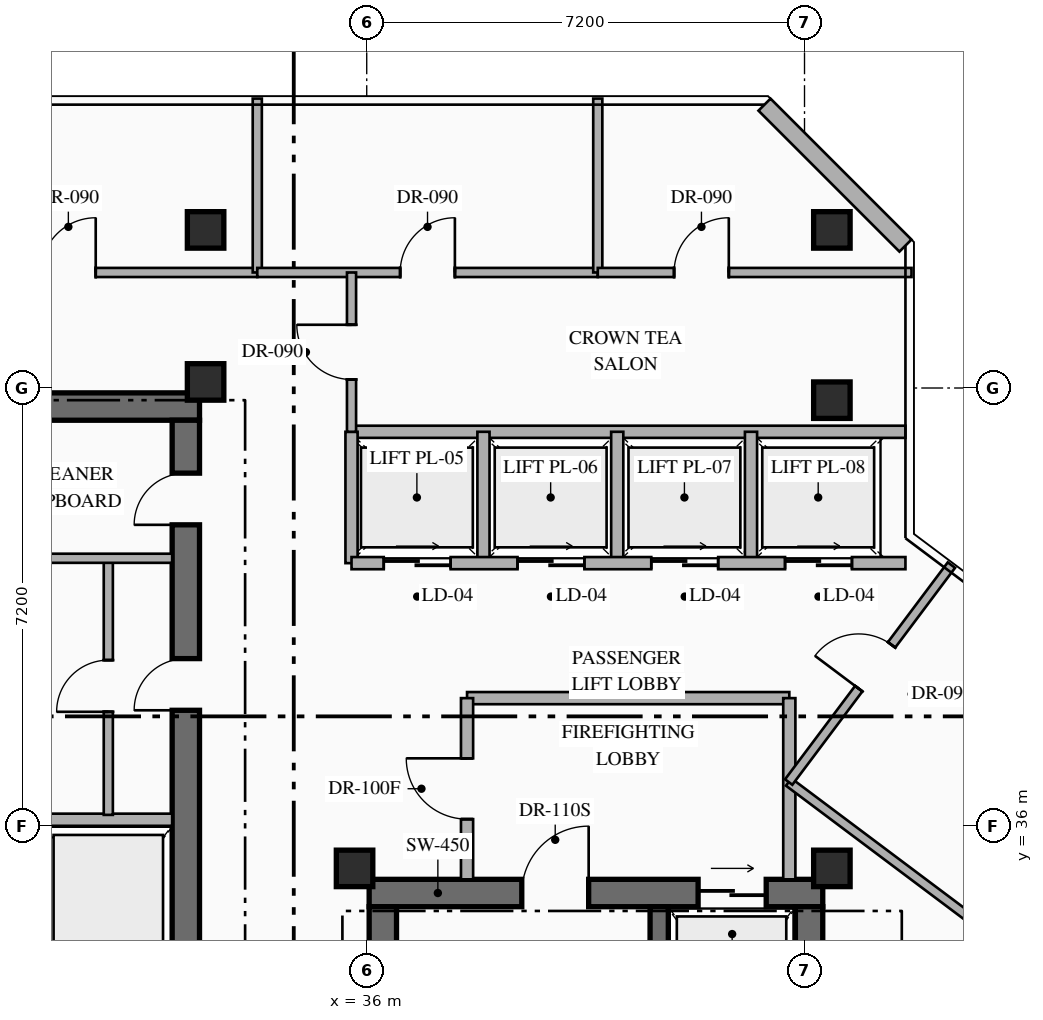
"""IFC4 building model, lengths in metres.
Left out: names, types, materials, properties, quantities, classifications, styles, units other than length and angle.
Written with IfcOpenShell. Run it as: python <this file> out.ifc"""

import sys

from ifc_helpers import new_model, si_unit, direction, frame, frame_2d, origin, origin_2d, place, context, subcontext, project, spatial, rectangle, hollow_rectangle, extrude, element, fill, save


model = new_model("IFC4")
c1 = context("Model", 3, precision=1e-05, world=origin(), true_north=direction((0.0, 1.0)))
c2 = subcontext(c1, "Body", "Model", "MODEL_VIEW")
j1 = project(units=[si_unit("LENGTHUNIT", "METRE"), si_unit("PLANEANGLEUNIT", "RADIAN")], contexts=[c1])
p1 = place(None, origin())
s1 = spatial("IfcSite", under=j1, at=p1, CompositionType="ELEMENT")
p2 = place(p1, origin())
s2 = spatial("IfcBuilding", under=s1, at=p2, CompositionType="ELEMENT")
p3 = place(p2, frame((0.0, 0.0, 277.95)))
s3 = spatial("IfcBuildingStorey", under=s2, at=p3, CompositionType="ELEMENT", Elevation=277.95)
p4 = place(p3, frame((25.77, 42.895, 0.0), z_axis=(0.0, 0.0, 1.0), x_axis=(1.0, 0.0, 0.0)))
e1 = element("IfcWall", 1, at=p4, inside=s3, PredefinedType="SHEAR", context=c2, shape_type="SweptSolid", body=[
    extrude(rectangle(XDim=7.48, YDim=0.45, at=frame_2d((3.74, 0.0))), origin(), (0.0, 0.0, 1.0), 4.0),
])
p5 = place(p3, frame((33.025, 33.19, 0.0), z_axis=(0.0, 0.0, 1.0), x_axis=(0.0, 1.0, 0.0)))
e2 = element("IfcWall", 2, at=p5, inside=s3, PredefinedType="SHEAR", context=c2, shape_type="SweptSolid", body=[
    extrude(rectangle(XDim=9.48, YDim=0.45, at=frame_2d((4.74, 0.0))), origin(), (0.0, 0.0, 1.0), 4.0),
])
p6 = place(p5, frame((4.71, 0.0, 0.0)))
e3 = element("IfcOpeningElement", 3, at=p6, cuts=e2, PredefinedType="OPENING", context=c2, shape_type="SweptSolid", body=[
    extrude(rectangle(XDim=0.85, YDim=2.08, at=frame_2d((0.425, 1.04))), frame((0.0, 0.235, 0.0), z_axis=(0.0, -1.0, 0.0), x_axis=(1.0, 0.0, 0.0)), (0.0, 0.0, 1.0), 0.47),
])
p7 = place(p5, frame((7.76, 0.0, 0.0)))
e4 = element("IfcOpeningElement", 4, at=p7, cuts=e2, PredefinedType="OPENING", context=c2, shape_type="SweptSolid", body=[
    extrude(rectangle(XDim=0.85, YDim=2.08, at=frame_2d((0.425, 1.04))), frame((0.0, 0.235, 0.0), z_axis=(0.0, -1.0, 0.0), x_axis=(1.0, 0.0, 0.0)), (0.0, 0.0, 1.0), 0.47),
])
p8 = place(p3, frame((36.04, 34.895, 0.0), z_axis=(0.0, 0.0, 1.0), x_axis=(1.0, 0.0, 0.0)))
e5 = element("IfcWall", 5, at=p8, inside=s3, PredefinedType="SHEAR", context=c2, shape_type="SweptSolid", body=[
    extrude(rectangle(XDim=7.46, YDim=0.45, at=frame_2d((3.73, 0.0))), origin(), (0.0, 0.0, 1.0), 4.0),
])
p9 = place(p8, frame((2.51, 0.0, 0.0)))
e6 = element("IfcOpeningElement", 6, at=p9, cuts=e5, PredefinedType="OPENING", context=c2, shape_type="SweptSolid", body=[
    extrude(rectangle(XDim=1.1, YDim=2.2, at=frame_2d((0.55, 1.1))), frame((0.0, 0.235, 0.0), z_axis=(0.0, -1.0, 0.0), x_axis=(1.0, 0.0, 0.0)), (0.0, 0.0, 1.0), 0.47),
])
p10 = place(p8, frame((5.41, 0.0, 0.0)))
e7 = element("IfcOpeningElement", 7, at=p10, cuts=e5, PredefinedType="OPENING", context=c2, shape_type="SweptSolid", body=[
    extrude(rectangle(XDim=1.12, YDim=2.15, at=frame_2d((0.56, 1.075))), frame((0.0, 0.235, 0.0), z_axis=(0.0, -1.0, 0.0), x_axis=(1.0, 0.0, 0.0)), (0.0, 0.0, 1.0), 0.47),
])
p11 = place(p3, frame((36.265, 25.19, 0.0), z_axis=(0.0, 0.0, 1.0), x_axis=(0.0, 1.0, 0.0)))
e8 = element("IfcWall", 8, at=p11, inside=s3, PredefinedType="SHEAR", context=c2, shape_type="SweptSolid", body=[
    extrude(rectangle(XDim=9.48, YDim=0.45, at=frame_2d((4.74, 0.0))), origin(), (0.0, 0.0, 1.0), 4.0),
])
p12 = place(p3, frame((43.275, 25.19, 0.0), z_axis=(0.0, 0.0, 1.0), x_axis=(0.0, 1.0, 0.0)))
e9 = element("IfcWall", 9, at=p12, inside=s3, PredefinedType="SHEAR", context=c2, shape_type="SweptSolid", body=[
    extrude(rectangle(XDim=9.48, YDim=0.45, at=frame_2d((4.74, 0.0))), origin(), (0.0, 0.0, 1.0), 4.0),
])
p13 = place(p12, frame((1.51, 0.0, 0.0)))
e10 = element("IfcOpeningElement", 10, at=p13, cuts=e9, PredefinedType="OPENING", context=c2, shape_type="SweptSolid", body=[
    extrude(rectangle(XDim=0.85, YDim=2.08, at=frame_2d((0.425, 1.04))), frame((0.0, 0.235, 0.0), z_axis=(0.0, -1.0, 0.0), x_axis=(1.0, 0.0, 0.0)), (0.0, 0.0, 1.0), 0.47),
])
p14 = place(p12, frame((4.76, 0.0, 0.0)))
e11 = element("IfcOpeningElement", 11, at=p14, cuts=e9, PredefinedType="OPENING", context=c2, shape_type="SweptSolid", body=[
    extrude(rectangle(XDim=0.85, YDim=2.08, at=frame_2d((0.425, 1.04))), frame((0.0, 0.235, 0.0), z_axis=(0.0, -1.0, 0.0), x_axis=(1.0, 0.0, 0.0)), (0.0, 0.0, 1.0), 0.47),
])
p15 = place(p3, frame((40.81, 25.19, 0.0), z_axis=(0.0, 0.0, 1.0), x_axis=(0.0, 1.0, 0.0)))
e12 = element("IfcWall", 12, at=p15, inside=s3, PredefinedType="SHEAR", context=c2, shape_type="SweptSolid", body=[
    extrude(rectangle(XDim=9.48, YDim=0.3, at=frame_2d((4.74, 0.0))), origin(), (0.0, 0.0, 1.0), 4.0),
])
for number, where, z_axis, x_axis in (
    (13, (33.35, 43.3, 0.0), (0.0, 0.0, 1.0), (1.0, 0.0, 0.0)),
    (14, (35.8, 35.3, 0.0), (0.0, 0.0, 1.0), (1.0, 0.0, 0.0)),
    (15, (43.65, 35.3, 0.0), (0.0, 0.0, 1.0), (1.0, 0.0, 0.0)),
    (16, (43.65, 43.0, 0.0), (0.0, 0.0, 1.0), (1.0, 0.0, 0.0)),
    (17, (33.35, 45.8, 0.0), (0.0, 0.0, 1.0), (1.0, 0.0, 0.0)),
    (18, (43.65, 45.8, 0.0), (0.0, 0.0, 1.0), (1.0, 0.0, 0.0)),
):
    element("IfcColumn", number, at=place(p3, frame(where, z_axis=z_axis, x_axis=x_axis)), inside=s3, PredefinedType="COLUMN", context=c2, shape_type="SweptSolid", body=[
        extrude(hollow_rectangle(XDim=0.6, YDim=0.6, WallThickness=0.025, at=origin_2d()), origin(), (0.0, 0.0, 1.0), 4.0),
    ])
p16 = place(p3, frame((42.542, 47.86, 0.0), z_axis=(0.0, 0.0, 1.0), x_axis=(0.707106781187, -0.707106781187, 0.0)))
e19 = element("IfcWall", 19, at=p16, inside=s3, PredefinedType="STANDARD", context=c2, shape_type="SweptSolid", body=[
    extrude(rectangle(XDim=3.278, YDim=0.28, at=frame_2d((1.639, 0.0))), origin(), (0.0, 0.0, 1.0), 3.74),
])
p17 = place(p3, frame((30.7, 36.1, 0.0), z_axis=(0.0, 0.0, 1.0), x_axis=(1.0, 0.0, 0.0)))
e20 = element("IfcWall", 20, at=p17, inside=s3, PredefinedType="STANDARD", context=c2, shape_type="SweptSolid", body=[
    extrude(rectangle(XDim=2.1, YDim=0.2, at=frame_2d((1.05, 0.0))), origin(), (0.0, 0.0, 1.0), 3.74),
])
p18 = place(p3, frame((31.75, 36.18, 0.0), z_axis=(0.0, 0.0, 1.0), x_axis=(0.0, 1.0, 0.0)))
e21 = element("IfcWall", 21, at=p18, inside=s3, PredefinedType="PARTITIONING", context=c2, shape_type="SweptSolid", body=[
    extrude(rectangle(XDim=4.24, YDim=0.15, at=frame_2d((2.12, 0.0))), origin(), (0.0, 0.0, 1.0), 3.74),
])
p19 = place(p18, frame((1.695, 0.0, 0.0)))
e22 = element("IfcOpeningElement", 22, at=p19, cuts=e21, PredefinedType="OPENING", context=c2, shape_type="SweptSolid", body=[
    extrude(rectangle(XDim=0.85, YDim=2.08, at=frame_2d((0.425, 1.04))), frame((0.0, 0.085, 0.0), z_axis=(0.0, -1.0, 0.0), x_axis=(1.0, 0.0, 0.0)), (0.0, 0.0, 1.0), 0.17),
])
p20 = place(p3, frame((30.7, 40.4, 0.0), z_axis=(0.0, 0.0, 1.0), x_axis=(1.0, 0.0, 0.0)))
e23 = element("IfcWall", 23, at=p20, inside=s3, PredefinedType="PARTITIONING", context=c2, shape_type="SweptSolid", body=[
    extrude(rectangle(XDim=2.1, YDim=0.15, at=frame_2d((1.05, 0.0))), origin(), (0.0, 0.0, 1.0), 3.74),
])
p21 = place(p3, frame((37.65, 38.1, 0.0), z_axis=(0.0, 0.0, 1.0), x_axis=(1.0, 0.0, 0.0)))
e24 = element("IfcWall", 24, at=p21, inside=s3, PredefinedType="STANDARD", context=c2, shape_type="SweptSolid", body=[
    extrude(rectangle(XDim=5.3, YDim=0.2, at=frame_2d((2.65, 0.0))), origin(), (0.0, 0.0, 1.0), 3.74),
])
p22 = place(p3, frame((42.95, 35.12, 0.0), z_axis=(0.0, 0.0, 1.0), x_axis=(0.0, 1.0, 0.0)))
e25 = element("IfcWall", 25, at=p22, inside=s3, PredefinedType="STANDARD", context=c2, shape_type="SweptSolid", body=[
    extrude(rectangle(XDim=2.98, YDim=0.2, at=frame_2d((1.49, 0.0))), origin(), (0.0, 0.0, 1.0), 3.74),
])
p23 = place(p3, frame((37.65, 35.12, 0.0), z_axis=(0.0, 0.0, 1.0), x_axis=(0.0, 1.0, 0.0)))
e26 = element("IfcWall", 26, at=p23, inside=s3, PredefinedType="STANDARD", context=c2, shape_type="SweptSolid", body=[
    extrude(rectangle(XDim=2.98, YDim=0.2, at=frame_2d((1.49, 0.0))), origin(), (0.0, 0.0, 1.0), 3.74),
])
p24 = place(p23, frame((0.99, 0.0, 0.0)))
e27 = element("IfcOpeningElement", 27, at=p24, cuts=e26, PredefinedType="OPENING", context=c2, shape_type="SweptSolid", body=[
    extrude(rectangle(XDim=1.0, YDim=2.2, at=frame_2d((0.5, 1.1))), frame((0.0, 0.11, 0.0), z_axis=(0.0, -1.0, 0.0), x_axis=(1.0, 0.0, 0.0)), (0.0, 0.0, 1.0), 0.22),
])
p25 = place(p3, frame((35.75, 42.48, 0.0), z_axis=(0.0, 0.0, 1.0), x_axis=(1.0, 0.0, 0.0)))
e28 = element("IfcWall", 28, at=p25, inside=s3, PredefinedType="STANDARD", context=c2, shape_type="SweptSolid", body=[
    extrude(rectangle(XDim=9.11, YDim=0.2, at=frame_2d((4.555, 0.0))), origin(), (0.0, 0.0, 1.0), 3.74),
])
for number, where, z_axis, x_axis in (
    (29, (35.75, 40.32, 0.0), (0.0, 0.0, 1.0), (0.0, 1.0, 0.0)),
    (30, (37.92, 40.32, 0.0), (0.0, 0.0, 1.0), (0.0, 1.0, 0.0)),
    (31, (40.12, 40.32, 0.0), (0.0, 0.0, 1.0), (0.0, 1.0, 0.0)),
    (32, (42.32, 40.32, 0.0), (0.0, 0.0, 1.0), (0.0, 1.0, 0.0)),
):
    element("IfcWall", number, at=place(p3, frame(where, z_axis=z_axis, x_axis=x_axis)), inside=s3, PredefinedType="STANDARD", context=c2, shape_type="SweptSolid", body=[
        extrude(rectangle(XDim=2.16, YDim=0.2, at=frame_2d((1.08, 0.0))), origin(), (0.0, 0.0, 1.0), 3.74),
    ])
p26 = place(p3, frame((35.75, 40.32, 0.0), z_axis=(0.0, 0.0, 1.0), x_axis=(1.0, 0.0, 0.0)))
e33 = element("IfcWall", 33, at=p26, inside=s3, PredefinedType="STANDARD", context=c2, shape_type="SweptSolid", body=[
    extrude(rectangle(XDim=9.11, YDim=0.2, at=frame_2d((4.555, 0.0))), origin(), (0.0, 0.0, 1.0), 3.74),
])
p27 = place(p26, frame((0.53, 0.0, 0.0)))
e34 = element("IfcOpeningElement", 34, at=p27, cuts=e33, PredefinedType="OPENING", context=c2, shape_type="SweptSolid", body=[
    extrude(rectangle(XDim=1.1, YDim=2.18, at=frame_2d((0.55, 1.09))), frame((0.0, 0.11, 0.0), z_axis=(0.0, -1.0, 0.0), x_axis=(1.0, 0.0, 0.0)), (0.0, 0.0, 1.0), 0.22),
])
p28 = place(p26, frame((2.73, 0.0, 0.0)))
e35 = element("IfcOpeningElement", 35, at=p28, cuts=e33, PredefinedType="OPENING", context=c2, shape_type="SweptSolid", body=[
    extrude(rectangle(XDim=1.1, YDim=2.18, at=frame_2d((0.55, 1.09))), frame((0.0, 0.11, 0.0), z_axis=(0.0, -1.0, 0.0), x_axis=(1.0, 0.0, 0.0)), (0.0, 0.0, 1.0), 0.22),
])
p29 = place(p26, frame((4.93, 0.0, 0.0)))
e36 = element("IfcOpeningElement", 36, at=p29, cuts=e33, PredefinedType="OPENING", context=c2, shape_type="SweptSolid", body=[
    extrude(rectangle(XDim=1.1, YDim=2.18, at=frame_2d((0.55, 1.09))), frame((0.0, 0.11, 0.0), z_axis=(0.0, -1.0, 0.0), x_axis=(1.0, 0.0, 0.0)), (0.0, 0.0, 1.0), 0.22),
])
p30 = place(p26, frame((7.13, 0.0, 0.0)))
e37 = element("IfcOpeningElement", 37, at=p30, cuts=e33, PredefinedType="OPENING", context=c2, shape_type="SweptSolid", body=[
    extrude(rectangle(XDim=1.1, YDim=2.18, at=frame_2d((0.55, 1.09))), frame((0.0, 0.11, 0.0), z_axis=(0.0, -1.0, 0.0), x_axis=(1.0, 0.0, 0.0)), (0.0, 0.0, 1.0), 0.22),
])
p31 = place(p3, frame((28.4, 45.1, 0.0), z_axis=(0.0, 0.0, 1.0), x_axis=(1.0, 0.0, 0.0)))
e38 = element("IfcWall", 38, at=p31, inside=s3, PredefinedType="PARTITIONING", context=c2, shape_type="SweptSolid", body=[
    extrude(rectangle(XDim=5.8, YDim=0.15, at=frame_2d((2.9, 0.0))), origin(), (0.0, 0.0, 1.0), 3.74),
])
p32 = place(p31, frame((2.243, 0.0, 0.0)))
e39 = element("IfcOpeningElement", 39, at=p32, cuts=e38, PredefinedType="OPENING", context=c2, shape_type="SweptSolid", body=[
    extrude(rectangle(XDim=0.9, YDim=2.15, at=frame_2d((0.45, 1.075))), frame((0.0, 0.085, 0.0), z_axis=(0.0, -1.0, 0.0), x_axis=(1.0, 0.0, 0.0)), (0.0, 0.0, 1.0), 0.17),
])
p33 = place(p3, frame((34.2, 45.1, 0.0), z_axis=(0.0, 0.0, 1.0), x_axis=(0.0, 1.0, 0.0)))
e40 = element("IfcWall", 40, at=p33, inside=s3, PredefinedType="PARTITIONING", context=c2, shape_type="SweptSolid", body=[
    extrude(rectangle(XDim=2.86, YDim=0.15, at=frame_2d((1.43, 0.0))), origin(), (0.0, 0.0, 1.0), 3.74),
])
p34 = place(p3, frame((34.2, 45.1, 0.0), z_axis=(0.0, 0.0, 1.0), x_axis=(1.0, 0.0, 0.0)))
e41 = element("IfcWall", 41, at=p34, inside=s3, PredefinedType="PARTITIONING", context=c2, shape_type="SweptSolid", body=[
    extrude(rectangle(XDim=5.6, YDim=0.15, at=frame_2d((2.8, 0.0))), origin(), (0.0, 0.0, 1.0), 3.74),
])
p35 = place(p34, frame((2.35, 0.0, 0.0)))
e42 = element("IfcOpeningElement", 42, at=p35, cuts=e41, PredefinedType="OPENING", context=c2, shape_type="SweptSolid", body=[
    extrude(rectangle(XDim=0.9, YDim=2.15, at=frame_2d((0.45, 1.075))), frame((0.0, 0.085, 0.0), z_axis=(0.0, -1.0, 0.0), x_axis=(1.0, 0.0, 0.0)), (0.0, 0.0, 1.0), 0.17),
])
p36 = place(p3, frame((39.8, 45.1, 0.0), z_axis=(0.0, 0.0, 1.0), x_axis=(0.0, 1.0, 0.0)))
e43 = element("IfcWall", 43, at=p36, inside=s3, PredefinedType="PARTITIONING", context=c2, shape_type="SweptSolid", body=[
    extrude(rectangle(XDim=2.86, YDim=0.15, at=frame_2d((1.43, 0.0))), origin(), (0.0, 0.0, 1.0), 3.74),
])
p37 = place(p3, frame((39.8, 45.1, 0.0), z_axis=(0.0, 0.0, 1.0), x_axis=(1.0, 0.0, 0.0)))
e44 = element("IfcWall", 44, at=p37, inside=s3, PredefinedType="PARTITIONING", context=c2, shape_type="SweptSolid", body=[
    extrude(rectangle(XDim=5.16, YDim=0.15, at=frame_2d((2.58, 0.0))), origin(), (0.0, 0.0, 1.0), 3.74),
])
p38 = place(p37, frame((1.255, 0.0, 0.0)))
e45 = element("IfcOpeningElement", 45, at=p38, cuts=e44, PredefinedType="OPENING", context=c2, shape_type="SweptSolid", body=[
    extrude(rectangle(XDim=0.9, YDim=2.15, at=frame_2d((0.45, 1.075))), frame((0.0, 0.085, 0.0), z_axis=(0.0, -1.0, 0.0), x_axis=(1.0, 0.0, 0.0)), (0.0, 0.0, 1.0), 0.17),
])
p39 = place(p3, frame((35.75, 42.48, 0.0), z_axis=(0.0, 0.0, 1.0), x_axis=(0.0, 1.0, 0.0)))
e46 = element("IfcWall", 46, at=p39, inside=s3, PredefinedType="PARTITIONING", context=c2, shape_type="SweptSolid", body=[
    extrude(rectangle(XDim=2.62, YDim=0.15, at=frame_2d((1.31, 0.0))), origin(), (0.0, 0.0, 1.0), 3.74),
])
p40 = place(p39, frame((0.86, 0.0, 0.0)))
e47 = element("IfcOpeningElement", 47, at=p40, cuts=e46, PredefinedType="OPENING", context=c2, shape_type="SweptSolid", body=[
    extrude(rectangle(XDim=0.9, YDim=2.15, at=frame_2d((0.45, 1.075))), frame((0.0, 0.085, 0.0), z_axis=(0.0, -1.0, 0.0), x_axis=(1.0, 0.0, 0.0)), (0.0, 0.0, 1.0), 0.17),
])
p41 = place(p3, frame((43.48, 30.107, 0.0), z_axis=(0.0, 0.0, 1.0), x_axis=(0.600015730265, 0.799988202059, 0.0)))
e48 = element("IfcWall", 48, at=p41, inside=s3, PredefinedType="PARTITIONING", context=c2, shape_type="SweptSolid", body=[
    extrude(rectangle(XDim=4.967, YDim=0.15, at=frame_2d((2.483, 0.0))), origin(), (0.0, 0.0, 1.0), 3.74),
])
p42 = place(p41, frame((2.199, 0.0, 0.0)))
e49 = element("IfcOpeningElement", 49, at=p42, cuts=e48, PredefinedType="OPENING", context=c2, shape_type="SweptSolid", body=[
    extrude(rectangle(XDim=0.9, YDim=2.15, at=frame_2d((0.45, 1.075))), frame((0.0, 0.085, 0.0), z_axis=(0.0, -1.0, 0.0), x_axis=(1.0, 0.0, 0.0)), (0.0, 0.0, 1.0), 0.17),
])
p43 = place(p3, frame((42.94, 36.72, 0.0), z_axis=(0.0, 0.0, 1.0), x_axis=(0.800013316712, -0.599982243973, 0.0)))
e50 = element("IfcWall", 50, at=p43, inside=s3, PredefinedType="PARTITIONING", context=c2, shape_type="SweptSolid", body=[
    extrude(rectangle(XDim=4.4, YDim=0.15, at=frame_2d((2.2, 0.0))), origin(), (0.0, 0.0, 1.0), 3.295),
])
p44 = place(p3, frame((42.94, 36.72, 0.0), z_axis=(0.0, 0.0, 1.0), x_axis=(0.599991241767, 0.8000065686, 0.0)))
e51 = element("IfcWall", 51, at=p44, inside=s3, PredefinedType="PARTITIONING", context=c2, shape_type="SweptSolid", body=[
    extrude(rectangle(XDim=4.46, YDim=0.15, at=frame_2d((2.23, 0.0))), origin(), (0.0, 0.0, 1.0), 3.74),
])
p45 = place(p44, frame((1.92, 0.0, 0.0)))
e52 = element("IfcOpeningElement", 52, at=p45, cuts=e51, PredefinedType="OPENING", context=c2, shape_type="SweptSolid", body=[
    extrude(rectangle(XDim=0.9, YDim=2.15, at=frame_2d((0.45, 1.075))), frame((0.0, 0.085, 0.0), z_axis=(0.0, -1.0, 0.0), x_axis=(1.0, 0.0, 0.0)), (0.0, 0.0, 1.0), 0.17),
])
p46 = place(p9, origin())
e53 = element("IfcDoor", 53, at=p46, inside=s3, OperationType="SINGLE_SWING_RIGHT", PredefinedType="DOOR", context=c2, shape_type="SweptSolid", body=[
    extrude(rectangle(XDim=1.1, YDim=2.2, at=frame_2d((0.55, 1.1))), frame((0.0, 0.025, 0.0), z_axis=(0.0, -1.0, 0.0), x_axis=(1.0, 0.0, 0.0)), (0.0, 0.0, 1.0), 0.05),
])
fill(e6, e53)
p47 = place(p10, origin())
e54 = element("IfcDoor", 54, at=p47, inside=s3, OperationType="SLIDING_TO_RIGHT", PredefinedType="USERDEFINED", context=c2, shape_type="SweptSolid", body=[
    extrude(rectangle(XDim=1.12, YDim=2.15, at=frame_2d((0.56, 1.075))), frame((0.0, 0.025, 0.0), z_axis=(0.0, -1.0, 0.0), x_axis=(1.0, 0.0, 0.0)), (0.0, 0.0, 1.0), 0.05),
])
fill(e7, e54)
p48 = place(p6, origin())
e55 = element("IfcDoor", 55, at=p48, inside=s3, OperationType="SINGLE_SWING_LEFT", PredefinedType="DOOR", context=c2, shape_type="SweptSolid", body=[
    extrude(rectangle(XDim=0.85, YDim=2.08, at=frame_2d((0.425, 1.04))), frame((0.0, 0.025, 0.0), z_axis=(0.0, -1.0, 0.0), x_axis=(1.0, 0.0, 0.0)), (0.0, 0.0, 1.0), 0.05),
])
fill(e3, e55)
p49 = place(p7, origin())
e56 = element("IfcDoor", 56, at=p49, inside=s3, OperationType="SINGLE_SWING_LEFT", PredefinedType="DOOR", context=c2, shape_type="SweptSolid", body=[
    extrude(rectangle(XDim=0.85, YDim=2.08, at=frame_2d((0.425, 1.04))), frame((0.0, 0.025, 0.0), z_axis=(0.0, -1.0, 0.0), x_axis=(1.0, 0.0, 0.0)), (0.0, 0.0, 1.0), 0.05),
])
fill(e4, e56)
p50 = place(p19, origin())
e57 = element("IfcDoor", 57, at=p50, inside=s3, OperationType="SINGLE_SWING_LEFT", PredefinedType="DOOR", context=c2, shape_type="SweptSolid", body=[
    extrude(rectangle(XDim=0.85, YDim=2.08, at=frame_2d((0.425, 1.04))), frame((0.0, 0.025, 0.0), z_axis=(0.0, -1.0, 0.0), x_axis=(1.0, 0.0, 0.0)), (0.0, 0.0, 1.0), 0.05),
])
fill(e22, e57)
p51 = place(p24, origin())
e58 = element("IfcDoor", 58, at=p51, inside=s3, OperationType="SINGLE_SWING_RIGHT", PredefinedType="DOOR", context=c2, shape_type="SweptSolid", body=[
    extrude(rectangle(XDim=1.0, YDim=2.2, at=frame_2d((0.5, 1.1))), frame((0.0, 0.025, 0.0), z_axis=(0.0, -1.0, 0.0), x_axis=(1.0, 0.0, 0.0)), (0.0, 0.0, 1.0), 0.05),
])
fill(e27, e58)
p52 = place(p27, origin())
e59 = element("IfcDoor", 59, at=p52, inside=s3, OperationType="SLIDING_TO_RIGHT", PredefinedType="USERDEFINED", context=c2, shape_type="SweptSolid", body=[
    extrude(rectangle(XDim=1.1, YDim=2.18, at=frame_2d((0.55, 1.09))), frame((0.0, 0.025, 0.0), z_axis=(0.0, -1.0, 0.0), x_axis=(1.0, 0.0, 0.0)), (0.0, 0.0, 1.0), 0.05),
])
fill(e34, e59)
p53 = place(p28, origin())
e60 = element("IfcDoor", 60, at=p53, inside=s3, OperationType="SLIDING_TO_RIGHT", PredefinedType="USERDEFINED", context=c2, shape_type="SweptSolid", body=[
    extrude(rectangle(XDim=1.1, YDim=2.18, at=frame_2d((0.55, 1.09))), frame((0.0, 0.025, 0.0), z_axis=(0.0, -1.0, 0.0), x_axis=(1.0, 0.0, 0.0)), (0.0, 0.0, 1.0), 0.05),
])
fill(e35, e60)
p54 = place(p29, origin())
e61 = element("IfcDoor", 61, at=p54, inside=s3, OperationType="SLIDING_TO_RIGHT", PredefinedType="USERDEFINED", context=c2, shape_type="SweptSolid", body=[
    extrude(rectangle(XDim=1.1, YDim=2.18, at=frame_2d((0.55, 1.09))), frame((0.0, 0.025, 0.0), z_axis=(0.0, -1.0, 0.0), x_axis=(1.0, 0.0, 0.0)), (0.0, 0.0, 1.0), 0.05),
])
fill(e36, e61)
p55 = place(p30, origin())
e62 = element("IfcDoor", 62, at=p55, inside=s3, OperationType="SLIDING_TO_RIGHT", PredefinedType="USERDEFINED", context=c2, shape_type="SweptSolid", body=[
    extrude(rectangle(XDim=1.1, YDim=2.18, at=frame_2d((0.55, 1.09))), frame((0.0, 0.025, 0.0), z_axis=(0.0, -1.0, 0.0), x_axis=(1.0, 0.0, 0.0)), (0.0, 0.0, 1.0), 0.05),
])
fill(e37, e62)
p56 = place(p32, origin())
e63 = element("IfcDoor", 63, at=p56, inside=s3, OperationType="SINGLE_SWING_RIGHT", PredefinedType="DOOR", context=c2, shape_type="SweptSolid", body=[
    extrude(rectangle(XDim=0.9, YDim=2.15, at=frame_2d((0.45, 1.075))), frame((0.0, 0.025, 0.0), z_axis=(0.0, -1.0, 0.0), x_axis=(1.0, 0.0, 0.0)), (0.0, 0.0, 1.0), 0.05),
])
fill(e39, e63)
p57 = place(p35, origin())
e64 = element("IfcDoor", 64, at=p57, inside=s3, OperationType="SINGLE_SWING_RIGHT", PredefinedType="DOOR", context=c2, shape_type="SweptSolid", body=[
    extrude(rectangle(XDim=0.9, YDim=2.15, at=frame_2d((0.45, 1.075))), frame((0.0, 0.025, 0.0), z_axis=(0.0, -1.0, 0.0), x_axis=(1.0, 0.0, 0.0)), (0.0, 0.0, 1.0), 0.05),
])
fill(e42, e64)
p58 = place(p38, origin())
e65 = element("IfcDoor", 65, at=p58, inside=s3, OperationType="SINGLE_SWING_RIGHT", PredefinedType="DOOR", context=c2, shape_type="SweptSolid", body=[
    extrude(rectangle(XDim=0.9, YDim=2.15, at=frame_2d((0.45, 1.075))), frame((0.0, 0.025, 0.0), z_axis=(0.0, -1.0, 0.0), x_axis=(1.0, 0.0, 0.0)), (0.0, 0.0, 1.0), 0.05),
])
fill(e45, e65)
p59 = place(p40, origin())
e66 = element("IfcDoor", 66, at=p59, inside=s3, OperationType="SINGLE_SWING_RIGHT", PredefinedType="DOOR", context=c2, shape_type="SweptSolid", body=[
    extrude(rectangle(XDim=0.9, YDim=2.15, at=frame_2d((0.45, 1.075))), frame((0.0, 0.025, 0.0), z_axis=(0.0, -1.0, 0.0), x_axis=(1.0, 0.0, 0.0)), (0.0, 0.0, 1.0), 0.05),
])
fill(e47, e66)
p60 = place(p45, origin())
e67 = element("IfcDoor", 67, at=p60, inside=s3, OperationType="SINGLE_SWING_LEFT", PredefinedType="DOOR", context=c2, shape_type="SweptSolid", body=[
    extrude(rectangle(XDim=0.9, YDim=2.15, at=frame_2d((0.45, 1.075))), frame((0.0, 0.025, 0.0), z_axis=(0.0, -1.0, 0.0), x_axis=(1.0, 0.0, 0.0)), (0.0, 0.0, 1.0), 0.05),
])
fill(e52, e67)
save(model, sys.argv[1])
